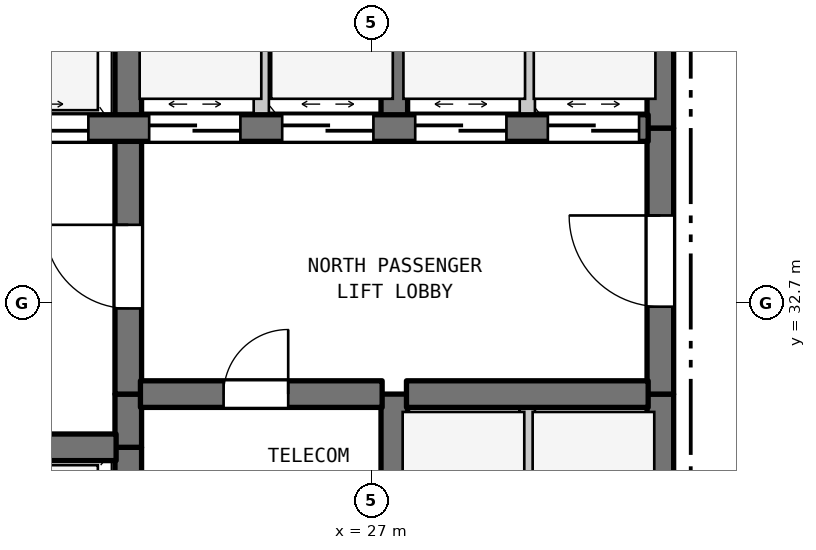
"""IFC4 building model, lengths in metres.
Left out: names, types, materials, properties, quantities, classifications, styles, units other than length and angle.
Written with IfcOpenShell. Run it as: python <this file> out.ifc"""

import sys

from ifc_helpers import new_model, si_unit, direction, frame, frame_2d, origin, place, context, subcontext, project, spatial, rectangle, extrude, element, fill, save


model = new_model("IFC4")
c1 = context("Model", 3, precision=1e-05, world=origin(), true_north=direction((0.0, 1.0)))
c2 = subcontext(c1, "Body", "Model", "MODEL_VIEW")
j1 = project(units=[si_unit("LENGTHUNIT", "METRE"), si_unit("PLANEANGLEUNIT", "RADIAN")], contexts=[c1])
p1 = place(None, origin())
s1 = spatial("IfcSite", under=j1, at=p1, CompositionType="ELEMENT")
p2 = place(p1, origin())
s2 = spatial("IfcBuilding", under=s1, at=p2, CompositionType="ELEMENT")
p3 = place(p2, frame((0.0, 0.0, 31.4)))
s3 = spatial("IfcBuildingStorey", under=s2, at=p3, CompositionType="ELEMENT", Elevation=31.4)
p4 = place(p3, frame((23.8, 29.5, 0.0), z_axis=(0.0, 0.0, 1.0), x_axis=(0.0, 1.0, 0.0)))
e1 = element("IfcWall", 1, at=p4, inside=s3, PredefinedType="SHEAR", context=c2, shape_type="SweptSolid", body=[
    extrude(rectangle(XDim=1.3, YDim=0.35, at=frame_2d((0.65, 0.0))), origin(), (0.0, 0.0, 1.0), 3.385),
])
p5 = place(p3, frame((23.8, 30.8, 0.0), z_axis=(0.0, 0.0, 1.0), x_axis=(0.0, 1.0, 0.0)))
e2 = element("IfcWall", 2, at=p5, inside=s3, PredefinedType="SHEAR", context=c2, shape_type="SweptSolid", body=[
    extrude(rectangle(XDim=0.7, YDim=0.35, at=frame_2d((0.35, 0.0))), origin(), (0.0, 0.0, 1.0), 3.385),
])
p6 = place(p3, frame((23.8, 31.5, 0.0), z_axis=(0.0, 0.0, 1.0), x_axis=(0.0, 1.0, 0.0)))
e3 = element("IfcWall", 3, at=p6, inside=s3, PredefinedType="SHEAR", context=c2, shape_type="SweptSolid", body=[
    extrude(rectangle(XDim=3.5, YDim=0.35, at=frame_2d((1.75, 0.0))), origin(), (0.0, 0.0, 1.0), 3.385),
])
p7 = place(p6, frame((1.127, 0.0, 0.0)))
e4 = element("IfcOpeningElement", 4, at=p7, cuts=e3, PredefinedType="OPENING", context=c2, shape_type="SweptSolid", body=[
    extrude(rectangle(XDim=1.1, YDim=2.15, at=frame_2d((0.55, 1.075))), frame((0.0, 0.185, 0.0), z_axis=(0.0, -1.0, 0.0), x_axis=(1.0, 0.0, 0.0)), (0.0, 0.0, 1.0), 0.37),
])
p8 = place(p3, frame((23.8, 35.0, 0.0), z_axis=(0.0, 0.0, 1.0), x_axis=(0.0, 1.0, 0.0)))
e5 = element("IfcWall", 5, at=p8, inside=s3, PredefinedType="SHEAR", context=c2, shape_type="SweptSolid", body=[
    extrude(rectangle(XDim=2.9, YDim=0.35, at=frame_2d((1.45, 0.0))), origin(), (0.0, 0.0, 1.0), 3.385),
])
p9 = place(p3, frame((25.55, 35.0, 0.0), z_axis=(0.0, 0.0, 1.0), x_axis=(0.0, 1.0, 0.0)))
e6 = element("IfcWall", 6, at=p9, inside=s3, PredefinedType="STANDARD", context=c2, shape_type="SweptSolid", body=[
    extrude(rectangle(XDim=2.9, YDim=0.2, at=frame_2d((1.45, 0.0))), origin(), (0.0, 0.0, 1.0), 3.385),
])
p10 = place(p3, frame((27.3, 29.5, 0.0), z_axis=(0.0, 0.0, 1.0), x_axis=(0.0, 1.0, 0.0)))
e7 = element("IfcWall", 7, at=p10, inside=s3, PredefinedType="SHEAR", context=c2, shape_type="SweptSolid", body=[
    extrude(rectangle(XDim=2.0, YDim=0.35, at=frame_2d((1.0, 0.0))), origin(), (0.0, 0.0, 1.0), 3.385),
])
p11 = place(p3, frame((27.3, 35.0, 0.0), z_axis=(0.0, 0.0, 1.0), x_axis=(0.0, 1.0, 0.0)))
e8 = element("IfcWall", 8, at=p11, inside=s3, PredefinedType="SHEAR", context=c2, shape_type="SweptSolid", body=[
    extrude(rectangle(XDim=2.9, YDim=0.35, at=frame_2d((1.45, 0.0))), origin(), (0.0, 0.0, 1.0), 3.385),
])
p12 = place(p3, frame((29.05, 28.9, 0.0), z_axis=(0.0, 0.0, 1.0), x_axis=(0.0, 1.0, 0.0)))
e9 = element("IfcWall", 9, at=p12, inside=s3, PredefinedType="STANDARD", context=c2, shape_type="SweptSolid", body=[
    extrude(rectangle(XDim=2.6, YDim=0.2, at=frame_2d((1.3, 0.0))), origin(), (0.0, 0.0, 1.0), 3.385),
])
p13 = place(p3, frame((29.05, 35.0, 0.0), z_axis=(0.0, 0.0, 1.0), x_axis=(0.0, 1.0, 0.0)))
e10 = element("IfcWall", 10, at=p13, inside=s3, PredefinedType="STANDARD", context=c2, shape_type="SweptSolid", body=[
    extrude(rectangle(XDim=2.9, YDim=0.2, at=frame_2d((1.45, 0.0))), origin(), (0.0, 0.0, 1.0), 3.385),
])
p14 = place(p3, frame((30.8, 28.9, 0.0), z_axis=(0.0, 0.0, 1.0), x_axis=(0.0, 1.0, 0.0)))
e11 = element("IfcWall", 11, at=p14, inside=s3, PredefinedType="SHEAR", context=c2, shape_type="SweptSolid", body=[
    extrude(rectangle(XDim=2.6, YDim=0.35, at=frame_2d((1.3, 0.0))), origin(), (0.0, 0.0, 1.0), 3.385),
])
p15 = place(p3, frame((30.8, 31.5, 0.0), z_axis=(0.0, 0.0, 1.0), x_axis=(0.0, 1.0, 0.0)))
e12 = element("IfcWall", 12, at=p15, inside=s3, PredefinedType="SHEAR", context=c2, shape_type="SweptSolid", body=[
    extrude(rectangle(XDim=3.5, YDim=0.35, at=frame_2d((1.75, 0.0))), origin(), (0.0, 0.0, 1.0), 3.385),
])
p16 = place(p15, frame((1.15, 0.0, 0.0)))
e13 = element("IfcOpeningElement", 13, at=p16, cuts=e12, PredefinedType="OPENING", context=c2, shape_type="SweptSolid", body=[
    extrude(rectangle(XDim=1.2, YDim=2.2, at=frame_2d((0.6, 1.1))), frame((0.0, 0.185, 0.0), z_axis=(0.0, -1.0, 0.0), x_axis=(1.0, 0.0, 0.0)), (0.0, 0.0, 1.0), 0.37),
])
p17 = place(p3, frame((30.8, 35.0, 0.0), z_axis=(0.0, 0.0, 1.0), x_axis=(0.0, 1.0, 0.0)))
e14 = element("IfcWall", 14, at=p17, inside=s3, PredefinedType="SHEAR", context=c2, shape_type="SweptSolid", body=[
    extrude(rectangle(XDim=2.9, YDim=0.35, at=frame_2d((1.45, 0.0))), origin(), (0.0, 0.0, 1.0), 3.385),
])
p18 = place(p3, frame((19.16, 30.8, 0.0), z_axis=(0.0, 0.0, 1.0), x_axis=(1.0, 0.0, 0.0)))
e15 = element("IfcWall", 15, at=p18, inside=s3, PredefinedType="SHEAR", context=c2, shape_type="SweptSolid", body=[
    extrude(rectangle(XDim=4.48, YDim=0.35, at=frame_2d((2.24, 0.0))), origin(), (0.0, 0.0, 1.0), 3.385),
])
p19 = place(p3, frame((23.96, 31.5, 0.0), z_axis=(0.0, 0.0, 1.0), x_axis=(1.0, 0.0, 0.0)))
e16 = element("IfcWall", 16, at=p19, inside=s3, PredefinedType="SHEAR", context=c2, shape_type="SweptSolid", body=[
    extrude(rectangle(XDim=3.18, YDim=0.35, at=frame_2d((1.59, 0.0))), origin(), (0.0, 0.0, 1.0), 3.385),
])
p20 = place(p19, frame((1.094, 0.0, 0.0)))
e17 = element("IfcOpeningElement", 17, at=p20, cuts=e16, PredefinedType="OPENING", context=c2, shape_type="SweptSolid", body=[
    extrude(rectangle(XDim=0.85, YDim=2.1, at=frame_2d((0.425, 1.05))), frame((0.0, 0.185, 0.0), z_axis=(0.0, -1.0, 0.0), x_axis=(1.0, 0.0, 0.0)), (0.0, 0.0, 1.0), 0.37),
])
p21 = place(p3, frame((27.46, 31.5, 0.0), z_axis=(0.0, 0.0, 1.0), x_axis=(1.0, 0.0, 0.0)))
e18 = element("IfcWall", 18, at=p21, inside=s3, PredefinedType="SHEAR", context=c2, shape_type="SweptSolid", body=[
    extrude(rectangle(XDim=3.18, YDim=0.35, at=frame_2d((1.59, 0.0))), origin(), (0.0, 0.0, 1.0), 3.385),
])
p22 = place(p3, frame((19.16, 35.0, 0.0), z_axis=(0.0, 0.0, 1.0), x_axis=(1.0, 0.0, 0.0)))
e19 = element("IfcWall", 19, at=p22, inside=s3, PredefinedType="SHEAR", context=c2, shape_type="SweptSolid", body=[
    extrude(rectangle(XDim=11.48, YDim=0.35, at=frame_2d((5.74, 0.0))), origin(), (0.0, 0.0, 1.0), 3.385),
])
p23 = place(p22, frame((0.365, 0.0, 0.0)))
e20 = element("IfcOpeningElement", 20, at=p23, cuts=e19, PredefinedType="OPENING", context=c2, shape_type="SweptSolid", body=[
    extrude(rectangle(XDim=1.35, YDim=2.2, at=frame_2d((0.675, 1.1))), frame((0.0, 0.185, 0.0), z_axis=(0.0, -1.0, 0.0), x_axis=(1.0, 0.0, 0.0)), (0.0, 0.0, 1.0), 0.37),
])
p24 = place(p22, frame((2.765, 0.0, 0.0)))
e21 = element("IfcOpeningElement", 21, at=p24, cuts=e19, PredefinedType="OPENING", context=c2, shape_type="SweptSolid", body=[
    extrude(rectangle(XDim=1.35, YDim=2.2, at=frame_2d((0.675, 1.1))), frame((0.0, 0.185, 0.0), z_axis=(0.0, -1.0, 0.0), x_axis=(1.0, 0.0, 0.0)), (0.0, 0.0, 1.0), 0.37),
])
p25 = place(p22, frame((4.915, 0.0, 0.0)))
e22 = element("IfcOpeningElement", 22, at=p25, cuts=e19, PredefinedType="OPENING", context=c2, shape_type="SweptSolid", body=[
    extrude(rectangle(XDim=1.2, YDim=2.2, at=frame_2d((0.6, 1.1))), frame((0.0, 0.185, 0.0), z_axis=(0.0, -1.0, 0.0), x_axis=(1.0, 0.0, 0.0)), (0.0, 0.0, 1.0), 0.37),
])
p26 = place(p22, frame((6.665, 0.0, 0.0)))
e23 = element("IfcOpeningElement", 23, at=p26, cuts=e19, PredefinedType="OPENING", context=c2, shape_type="SweptSolid", body=[
    extrude(rectangle(XDim=1.2, YDim=2.2, at=frame_2d((0.6, 1.1))), frame((0.0, 0.185, 0.0), z_axis=(0.0, -1.0, 0.0), x_axis=(1.0, 0.0, 0.0)), (0.0, 0.0, 1.0), 0.37),
])
p27 = place(p22, frame((8.415, 0.0, 0.0)))
e24 = element("IfcOpeningElement", 24, at=p27, cuts=e19, PredefinedType="OPENING", context=c2, shape_type="SweptSolid", body=[
    extrude(rectangle(XDim=1.2, YDim=2.2, at=frame_2d((0.6, 1.1))), frame((0.0, 0.185, 0.0), z_axis=(0.0, -1.0, 0.0), x_axis=(1.0, 0.0, 0.0)), (0.0, 0.0, 1.0), 0.37),
])
p28 = place(p22, frame((10.16, 0.0, 0.0)))
e25 = element("IfcOpeningElement", 25, at=p28, cuts=e19, PredefinedType="OPENING", context=c2, shape_type="SweptSolid", body=[
    extrude(rectangle(XDim=1.2, YDim=2.2, at=frame_2d((0.6, 1.1))), frame((0.0, 0.185, 0.0), z_axis=(0.0, -1.0, 0.0), x_axis=(1.0, 0.0, 0.0)), (0.0, 0.0, 1.0), 0.37),
])
p29 = place(p7, origin())
e26 = element("IfcDoor", 26, at=p29, inside=s3, OperationType="SINGLE_SWING_RIGHT", PredefinedType="DOOR", context=c2, shape_type="SweptSolid", body=[
    extrude(rectangle(XDim=1.1, YDim=2.15, at=frame_2d((0.55, 1.075))), frame((0.0, 0.025, 0.0), z_axis=(0.0, -1.0, 0.0), x_axis=(1.0, 0.0, 0.0)), (0.0, 0.0, 1.0), 0.05),
])
fill(e4, e26)
p30 = place(p16, origin())
e27 = element("IfcDoor", 27, at=p30, inside=s3, OperationType="SINGLE_SWING_RIGHT", PredefinedType="DOOR", context=c2, shape_type="SweptSolid", body=[
    extrude(rectangle(XDim=1.2, YDim=2.2, at=frame_2d((0.6, 1.1))), frame((0.0, 0.025, 0.0), z_axis=(0.0, -1.0, 0.0), x_axis=(1.0, 0.0, 0.0)), (0.0, 0.0, 1.0), 0.05),
])
fill(e13, e27)
p31 = place(p20, origin())
e28 = element("IfcDoor", 28, at=p31, inside=s3, OperationType="SINGLE_SWING_RIGHT", PredefinedType="DOOR", context=c2, shape_type="SweptSolid", body=[
    extrude(rectangle(XDim=0.85, YDim=2.1, at=frame_2d((0.425, 1.05))), frame((0.0, 0.025, 0.0), z_axis=(0.0, -1.0, 0.0), x_axis=(1.0, 0.0, 0.0)), (0.0, 0.0, 1.0), 0.05),
])
fill(e17, e28)
p32 = place(p24, origin())
e29 = element("IfcDoor", 29, at=p32, inside=s3, OperationType="DOUBLE_DOOR_SLIDING", PredefinedType="DOOR", context=c2, shape_type="SweptSolid", body=[
    extrude(rectangle(XDim=1.35, YDim=2.2, at=frame_2d((0.675, 1.1))), frame((0.0, 0.025, 0.0), z_axis=(0.0, -1.0, 0.0), x_axis=(1.0, 0.0, 0.0)), (0.0, 0.0, 1.0), 0.05),
])
fill(e21, e29)
p33 = place(p25, origin())
e30 = element("IfcDoor", 30, at=p33, inside=s3, OperationType="DOUBLE_DOOR_SLIDING", PredefinedType="DOOR", context=c2, shape_type="SweptSolid", body=[
    extrude(rectangle(XDim=1.2, YDim=2.2, at=frame_2d((0.6, 1.1))), frame((0.0, 0.025, 0.0), z_axis=(0.0, -1.0, 0.0), x_axis=(1.0, 0.0, 0.0)), (0.0, 0.0, 1.0), 0.05),
])
fill(e22, e30)
p34 = place(p26, origin())
e31 = element("IfcDoor", 31, at=p34, inside=s3, OperationType="DOUBLE_DOOR_SLIDING", PredefinedType="DOOR", context=c2, shape_type="SweptSolid", body=[
    extrude(rectangle(XDim=1.2, YDim=2.2, at=frame_2d((0.6, 1.1))), frame((0.0, 0.025, 0.0), z_axis=(0.0, -1.0, 0.0), x_axis=(1.0, 0.0, 0.0)), (0.0, 0.0, 1.0), 0.05),
])
fill(e23, e31)
p35 = place(p27, origin())
e32 = element("IfcDoor", 32, at=p35, inside=s3, OperationType="DOUBLE_DOOR_SLIDING", PredefinedType="DOOR", context=c2, shape_type="SweptSolid", body=[
    extrude(rectangle(XDim=1.2, YDim=2.2, at=frame_2d((0.6, 1.1))), frame((0.0, 0.025, 0.0), z_axis=(0.0, -1.0, 0.0), x_axis=(1.0, 0.0, 0.0)), (0.0, 0.0, 1.0), 0.05),
])
fill(e24, e32)
p36 = place(p28, origin())
e33 = element("IfcDoor", 33, at=p36, inside=s3, OperationType="DOUBLE_DOOR_SLIDING", PredefinedType="DOOR", context=c2, shape_type="SweptSolid", body=[
    extrude(rectangle(XDim=1.2, YDim=2.2, at=frame_2d((0.6, 1.1))), frame((0.0, 0.025, 0.0), z_axis=(0.0, -1.0, 0.0), x_axis=(1.0, 0.0, 0.0)), (0.0, 0.0, 1.0), 0.05),
])
fill(e25, e33)
save(model, sys.argv[1])
